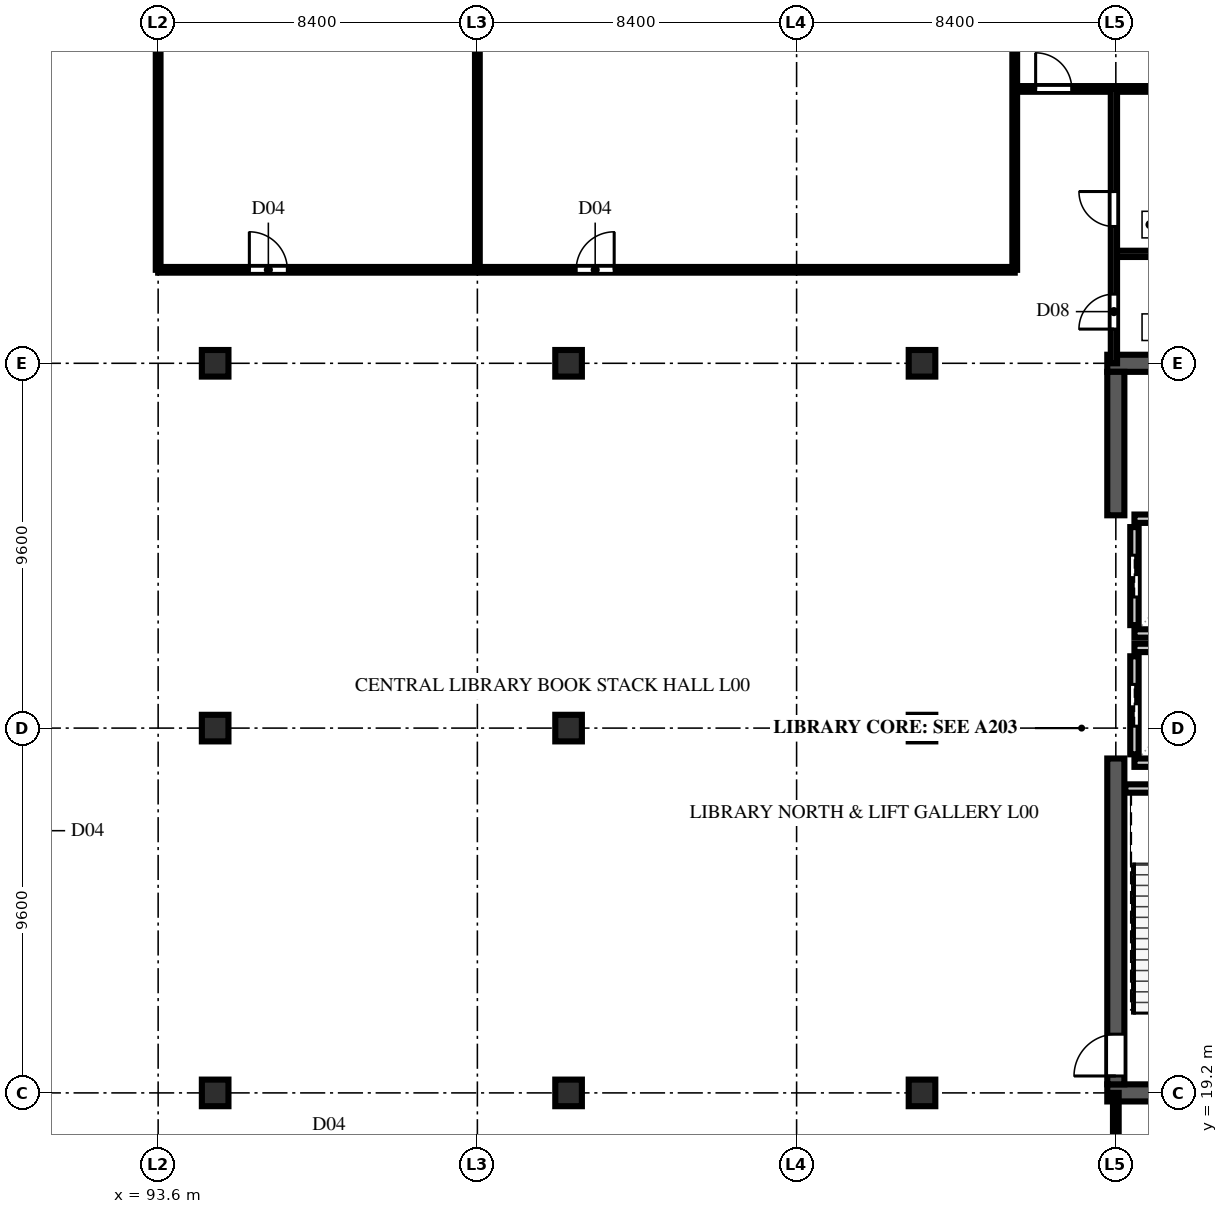
"""IFC4 building model, lengths in metres.
Left out: names, types, materials, properties, quantities, classifications, styles, units other than length and angle.
Written with IfcOpenShell. Run it as: python <this file> out.ifc"""

import sys

from ifc_helpers import new_model, si_unit, direction, frame, frame_2d, origin, origin_2d, place, context, subcontext, project, spatial, rectangle, extrude, element, fill, save


model = new_model("IFC4")
c1 = context("Model", 3, precision=1e-05, world=origin(), true_north=direction((0.0, 1.0)))
c2 = subcontext(c1, "Body", "Model", "MODEL_VIEW")
j1 = project(units=[si_unit("LENGTHUNIT", "METRE"), si_unit("PLANEANGLEUNIT", "RADIAN")], contexts=[c1])
p1 = place(None, origin())
s1 = spatial("IfcSite", under=j1, at=p1, CompositionType="ELEMENT")
p2 = place(p1, origin())
s2 = spatial("IfcBuilding", under=s1, at=p2, CompositionType="ELEMENT")
p3 = place(p2, origin())
s3 = spatial("IfcBuildingStorey", under=s2, at=p3, CompositionType="ELEMENT", Elevation=0.0)
for number, where, z_axis, x_axis in (
    (1, (118.575, 19.2, 0.0), (0.0, 0.0, 1.0), (1.0, 0.0, 0.0)),
    (2, (118.575, 38.4, 0.0), (0.0, 0.0, 1.0), (1.0, 0.0, 0.0)),
):
    element("IfcWall", number, at=place(p3, frame(where, z_axis=z_axis, x_axis=x_axis)), inside=s3, PredefinedType="SHEAR", context=c2, shape_type="SweptSolid", body=[
        extrude(rectangle(XDim=7.2, YDim=0.45, at=frame_2d((3.6, 0.0))), origin(), (0.0, 0.0, 1.0), 4.85),
    ])
p4 = place(p3, frame((118.8, 19.425, 0.0), z_axis=(0.0, 0.0, 1.0), x_axis=(0.0, 1.0, 0.0)))
e3 = element("IfcWall", 3, at=p4, inside=s3, PredefinedType="SHEAR", context=c2, shape_type="SweptSolid", body=[
    extrude(rectangle(XDim=8.575, YDim=0.45, at=frame_2d((4.288, 0.0))), origin(), (0.0, 0.0, 1.0), 4.85),
])
p5 = place(p4, frame((0.22, 0.0, 0.0)))
e4 = element("IfcOpeningElement", 4, at=p5, cuts=e3, PredefinedType="OPENING", context=c2, shape_type="SweptSolid", body=[
    extrude(rectangle(XDim=1.1, YDim=2.2, at=frame_2d((0.55, 1.1))), frame((0.0, 0.237, 0.0), z_axis=(0.0, -1.0, 0.0), x_axis=(1.0, 0.0, 0.0)), (0.0, 0.0, 1.0), 0.474),
])
p6 = place(p3, frame((118.8, 34.4, 0.0), z_axis=(0.0, 0.0, 1.0), x_axis=(0.0, 1.0, 0.0)))
e5 = element("IfcWall", 5, at=p6, inside=s3, PredefinedType="SHEAR", context=c2, shape_type="SweptSolid", body=[
    extrude(rectangle(XDim=3.775, YDim=0.45, at=frame_2d((1.888, 0.0))), origin(), (0.0, 0.0, 1.0), 4.85),
])
for number, where, z_axis, x_axis in (
    (6, (95.1, 19.2, 0.0), (0.0, 0.0, 1.0), (1.0, 0.0, 0.0)),
    (7, (95.1, 28.8, 0.0), (0.0, 0.0, 1.0), (1.0, 0.0, 0.0)),
    (8, (95.1, 38.4, 0.0), (0.0, 0.0, 1.0), (1.0, 0.0, 0.0)),
    (9, (104.4, 19.2, 0.0), (0.0, 0.0, 1.0), (1.0, 0.0, 0.0)),
    (10, (104.4, 28.8, 0.0), (0.0, 0.0, 1.0), (1.0, 0.0, 0.0)),
    (11, (104.4, 38.4, 0.0), (0.0, 0.0, 1.0), (1.0, 0.0, 0.0)),
    (12, (113.7, 19.2, 0.0), (0.0, 0.0, 1.0), (1.0, 0.0, 0.0)),
    (13, (113.7, 28.8, 0.0), (0.0, 0.0, 1.0), (1.0, 0.0, 0.0)),
    (14, (113.7, 38.4, 0.0), (0.0, 0.0, 1.0), (1.0, 0.0, 0.0)),
):
    element("IfcColumn", number, at=place(p3, frame(where, z_axis=z_axis, x_axis=x_axis)), inside=s3, PredefinedType="COLUMN", context=c2, shape_type="SweptSolid", body=[
        extrude(rectangle(XDim=0.7, YDim=0.7, at=origin_2d()), origin(), (0.0, 0.0, 1.0), 5.2),
    ])
p7 = place(p3, frame((119.05, 27.21, 0.0), z_axis=(0.0, 0.0, 1.0), x_axis=(1.0, 0.0, 0.0)))
e15 = element("IfcWall", 15, at=p7, inside=s3, PredefinedType="SOLIDWALL", context=c2, shape_type="SweptSolid", body=[
    extrude(rectangle(XDim=3.75, YDim=0.22, at=frame_2d((1.875, 0.0))), origin(), (0.0, 0.0, 1.0), 4.85),
])
p8 = place(p3, frame((119.29, 28.11, 0.0), z_axis=(0.0, 0.0, 1.0), x_axis=(0.0, 1.0, 0.0)))
e16 = element("IfcWall", 16, at=p8, inside=s3, PredefinedType="SOLIDWALL", context=c2, shape_type="SweptSolid", body=[
    extrude(rectangle(XDim=2.58, YDim=0.22, at=frame_2d((1.29, 0.0))), origin(), (0.0, 0.0, 1.0), 4.85),
])
p9 = place(p8, frame((0.74, 0.0, 0.0)))
e17 = element("IfcOpeningElement", 17, at=p9, cuts=e16, PredefinedType="OPENING", context=c2, shape_type="SweptSolid", body=[
    extrude(rectangle(XDim=1.1, YDim=2.2, at=frame_2d((0.55, 1.1))), frame((0.0, 0.122, 0.0), z_axis=(0.0, -1.0, 0.0), x_axis=(1.0, 0.0, 0.0)), (0.0, 0.0, 1.0), 0.244),
])
for number, where, z_axis, x_axis in (
    (18, (119.29, 27.89, 0.0), (0.0, 0.0, 1.0), (1.0, 0.0, 0.0)),
    (19, (119.29, 30.91, 0.0), (0.0, 0.0, 1.0), (1.0, 0.0, 0.0)),
):
    element("IfcWall", number, at=place(p3, frame(where, z_axis=z_axis, x_axis=x_axis)), inside=s3, PredefinedType="SOLIDWALL", context=c2, shape_type="SweptSolid", body=[
        extrude(rectangle(XDim=2.62, YDim=0.22, at=frame_2d((1.31, 0.0))), origin(), (0.0, 0.0, 1.0), 4.85),
    ])
p10 = place(p3, frame((119.29, 31.51, 0.0), z_axis=(0.0, 0.0, 1.0), x_axis=(0.0, 1.0, 0.0)))
e20 = element("IfcWall", 20, at=p10, inside=s3, PredefinedType="SOLIDWALL", context=c2, shape_type="SweptSolid", body=[
    extrude(rectangle(XDim=2.58, YDim=0.22, at=frame_2d((1.29, 0.0))), origin(), (0.0, 0.0, 1.0), 4.85),
])
p11 = place(p10, frame((0.74, 0.0, 0.0)))
e21 = element("IfcOpeningElement", 21, at=p11, cuts=e20, PredefinedType="OPENING", context=c2, shape_type="SweptSolid", body=[
    extrude(rectangle(XDim=1.1, YDim=2.2, at=frame_2d((0.55, 1.1))), frame((0.0, 0.122, 0.0), z_axis=(0.0, -1.0, 0.0), x_axis=(1.0, 0.0, 0.0)), (0.0, 0.0, 1.0), 0.244),
])
for number, where, z_axis, x_axis in (
    (22, (119.29, 31.29, 0.0), (0.0, 0.0, 1.0), (1.0, 0.0, 0.0)),
    (23, (119.29, 34.31, 0.0), (0.0, 0.0, 1.0), (1.0, 0.0, 0.0)),
):
    element("IfcWall", number, at=place(p3, frame(where, z_axis=z_axis, x_axis=x_axis)), inside=s3, PredefinedType="SOLIDWALL", context=c2, shape_type="SweptSolid", body=[
        extrude(rectangle(XDim=2.62, YDim=0.22, at=frame_2d((1.31, 0.0))), origin(), (0.0, 0.0, 1.0), 4.85),
    ])
p12 = place(p3, frame((118.8, 16.74, 0.0), z_axis=(0.0, 0.0, 1.0), x_axis=(0.0, 1.0, 0.0)))
e24 = element("IfcWall", 24, at=p12, inside=s3, PredefinedType="PARTITIONING", context=c2, shape_type="SweptSolid", body=[
    extrude(rectangle(XDim=2.46, YDim=0.15, at=frame_2d((1.23, 0.0))), origin(), (0.0, 0.0, 1.0), 4.85),
])
for number, where, z_axis, x_axis in (
    (25, (93.6, 40.86, 0.0), (0.0, 0.0, 1.0), (0.0, 1.0, 0.0)),
    (26, (102.0, 40.86, 0.0), (0.0, 0.0, 1.0), (0.0, 1.0, 0.0)),
    (27, (116.14, 40.86, 0.0), (0.0, 0.0, 1.0), (0.0, 1.0, 0.0)),
):
    element("IfcWall", number, at=place(p3, frame(where, z_axis=z_axis, x_axis=x_axis)), inside=s3, PredefinedType="PARTITIONING", context=c2, shape_type="SweptSolid", body=[
        extrude(rectangle(XDim=16.39, YDim=0.125, at=frame_2d((8.195, 0.0))), origin(), (0.0, 0.0, 1.0), 4.85),
    ])
p13 = place(p3, frame((93.6, 40.86, 0.0), z_axis=(0.0, 0.0, 1.0), x_axis=(1.0, 0.0, 0.0)))
e28 = element("IfcWall", 28, at=p13, inside=s3, PredefinedType="PARTITIONING", context=c2, shape_type="SweptSolid", body=[
    extrude(rectangle(XDim=22.54, YDim=0.15, at=frame_2d((11.27, 0.0))), origin(), (0.0, 0.0, 1.0), 4.85),
])
p14 = place(p13, frame((2.4, 0.0, 0.0)))
e29 = element("IfcOpeningElement", 29, at=p14, cuts=e28, PredefinedType="OPENING", context=c2, shape_type="SweptSolid", body=[
    extrude(rectangle(XDim=1.0, YDim=2.2, at=frame_2d((0.5, 1.1))), frame((0.0, 0.087, 0.0), z_axis=(0.0, -1.0, 0.0), x_axis=(1.0, 0.0, 0.0)), (0.0, 0.0, 1.0), 0.174),
])
p15 = place(p13, frame((11.0, 0.0, 0.0)))
e30 = element("IfcOpeningElement", 30, at=p15, cuts=e28, PredefinedType="OPENING", context=c2, shape_type="SweptSolid", body=[
    extrude(rectangle(XDim=1.0, YDim=2.2, at=frame_2d((0.5, 1.1))), frame((0.0, 0.087, 0.0), z_axis=(0.0, -1.0, 0.0), x_axis=(1.0, 0.0, 0.0)), (0.0, 0.0, 1.0), 0.174),
])
p16 = place(p3, frame((118.75, 41.28, 0.0), z_axis=(0.0, 0.0, 1.0), x_axis=(1.0, 0.0, 0.0)))
e31 = element("IfcWall", 31, at=p16, inside=s3, PredefinedType="PLUMBINGWALL", context=c2, shape_type="SweptSolid", body=[
    extrude(rectangle(XDim=8.1, YDim=0.165, at=frame_2d((4.05, 0.0))), origin(), (0.0, 0.0, 1.0), 4.85),
])
p17 = place(p3, frame((116.14, 45.62, 0.0), z_axis=(0.0, 0.0, 1.0), x_axis=(1.0, 0.0, 0.0)))
e32 = element("IfcWall", 32, at=p17, inside=s3, PredefinedType="PARTITIONING", context=c2, shape_type="SweptSolid", body=[
    extrude(rectangle(XDim=10.71, YDim=0.15, at=frame_2d((5.355, 0.0))), origin(), (0.0, 0.0, 1.0), 4.85),
])
p18 = place(p17, frame((0.55, 0.0, 0.0)))
e33 = element("IfcOpeningElement", 33, at=p18, cuts=e32, PredefinedType="OPENING", context=c2, shape_type="SweptSolid", body=[
    extrude(rectangle(XDim=0.95, YDim=2.15, at=frame_2d((0.475, 1.075))), frame((0.0, 0.087, 0.0), z_axis=(0.0, -1.0, 0.0), x_axis=(1.0, 0.0, 0.0)), (0.0, 0.0, 1.0), 0.174),
])
p19 = place(p3, frame((118.75, 38.4, 0.0), z_axis=(0.0, 0.0, 1.0), x_axis=(0.0, 1.0, 0.0)))
e34 = element("IfcWall", 34, at=p19, inside=s3, PredefinedType="PLUMBINGWALL", context=c2, shape_type="SweptSolid", body=[
    extrude(rectangle(XDim=7.22, YDim=0.165, at=frame_2d((3.61, 0.0))), origin(), (0.0, 0.0, 1.0), 4.85),
])
p20 = place(p19, frame((0.9, 0.0, 0.0)))
e35 = element("IfcOpeningElement", 35, at=p20, cuts=e34, PredefinedType="OPENING", context=c2, shape_type="SweptSolid", body=[
    extrude(rectangle(XDim=0.92, YDim=2.15, at=frame_2d((0.46, 1.075))), frame((0.0, 0.094, 0.0), z_axis=(0.0, -1.0, 0.0), x_axis=(1.0, 0.0, 0.0)), (0.0, 0.0, 1.0), 0.189),
])
p21 = place(p19, frame((3.6, 0.0, 0.0)))
e36 = element("IfcOpeningElement", 36, at=p21, cuts=e34, PredefinedType="OPENING", context=c2, shape_type="SweptSolid", body=[
    extrude(rectangle(XDim=0.92, YDim=2.15, at=frame_2d((0.46, 1.075))), frame((0.0, 0.094, 0.0), z_axis=(0.0, -1.0, 0.0), x_axis=(1.0, 0.0, 0.0)), (0.0, 0.0, 1.0), 0.189),
])
p22 = place(p5, origin())
e37 = element("IfcDoor", 37, at=p22, inside=s3, OperationType="SINGLE_SWING_LEFT", PredefinedType="DOOR", context=c2, shape_type="SweptSolid", body=[
    extrude(rectangle(XDim=1.1, YDim=2.2, at=frame_2d((0.55, 1.1))), frame((0.0, 0.025, 0.0), z_axis=(0.0, -1.0, 0.0), x_axis=(1.0, 0.0, 0.0)), (0.0, 0.0, 1.0), 0.05),
])
fill(e4, e37)
p23 = place(p9, origin())
e38 = element("IfcDoor", 38, at=p23, inside=s3, OperationType="DOUBLE_DOOR_SLIDING", PredefinedType="DOOR", context=c2, shape_type="SweptSolid", body=[
    extrude(rectangle(XDim=1.1, YDim=2.2, at=frame_2d((0.55, 1.1))), frame((0.0, 0.025, 0.0), z_axis=(0.0, -1.0, 0.0), x_axis=(1.0, 0.0, 0.0)), (0.0, 0.0, 1.0), 0.05),
])
fill(e17, e38)
p24 = place(p11, origin())
e39 = element("IfcDoor", 39, at=p24, inside=s3, OperationType="DOUBLE_DOOR_SLIDING", PredefinedType="DOOR", context=c2, shape_type="SweptSolid", body=[
    extrude(rectangle(XDim=1.1, YDim=2.2, at=frame_2d((0.55, 1.1))), frame((0.0, 0.025, 0.0), z_axis=(0.0, -1.0, 0.0), x_axis=(1.0, 0.0, 0.0)), (0.0, 0.0, 1.0), 0.05),
])
fill(e21, e39)
p25 = place(p14, origin())
e40 = element("IfcDoor", 40, at=p25, inside=s3, OperationType="SINGLE_SWING_LEFT", PredefinedType="DOOR", context=c2, shape_type="SweptSolid", body=[
    extrude(rectangle(XDim=1.0, YDim=2.2, at=frame_2d((0.5, 1.1))), frame((0.0, 0.025, 0.0), z_axis=(0.0, -1.0, 0.0), x_axis=(1.0, 0.0, 0.0)), (0.0, 0.0, 1.0), 0.05),
])
fill(e29, e40)
p26 = place(p15, origin())
e41 = element("IfcDoor", 41, at=p26, inside=s3, OperationType="SINGLE_SWING_RIGHT", PredefinedType="DOOR", context=c2, shape_type="SweptSolid", body=[
    extrude(rectangle(XDim=1.0, YDim=2.2, at=frame_2d((0.5, 1.1))), frame((0.0, 0.025, 0.0), z_axis=(0.0, -1.0, 0.0), x_axis=(1.0, 0.0, 0.0)), (0.0, 0.0, 1.0), 0.05),
])
fill(e30, e41)
p27 = place(p18, origin())
e42 = element("IfcDoor", 42, at=p27, inside=s3, OperationType="SINGLE_SWING_LEFT", PredefinedType="DOOR", context=c2, shape_type="SweptSolid", body=[
    extrude(rectangle(XDim=0.95, YDim=2.15, at=frame_2d((0.475, 1.075))), frame((0.0, 0.025, 0.0), z_axis=(0.0, -1.0, 0.0), x_axis=(1.0, 0.0, 0.0)), (0.0, 0.0, 1.0), 0.05),
])
fill(e33, e42)
p28 = place(p20, origin())
e43 = element("IfcDoor", 43, at=p28, inside=s3, OperationType="SINGLE_SWING_LEFT", PredefinedType="DOOR", context=c2, shape_type="SweptSolid", body=[
    extrude(rectangle(XDim=0.92, YDim=2.15, at=frame_2d((0.46, 1.075))), frame((0.0, 0.025, 0.0), z_axis=(0.0, -1.0, 0.0), x_axis=(1.0, 0.0, 0.0)), (0.0, 0.0, 1.0), 0.05),
])
fill(e35, e43)
p29 = place(p21, origin())
e44 = element("IfcDoor", 44, at=p29, inside=s3, OperationType="SINGLE_SWING_RIGHT", PredefinedType="DOOR", context=c2, shape_type="SweptSolid", body=[
    extrude(rectangle(XDim=0.92, YDim=2.15, at=frame_2d((0.46, 1.075))), frame((0.0, 0.025, 0.0), z_axis=(0.0, -1.0, 0.0), x_axis=(1.0, 0.0, 0.0)), (0.0, 0.0, 1.0), 0.05),
])
fill(e36, e44)
save(model, sys.argv[1])
